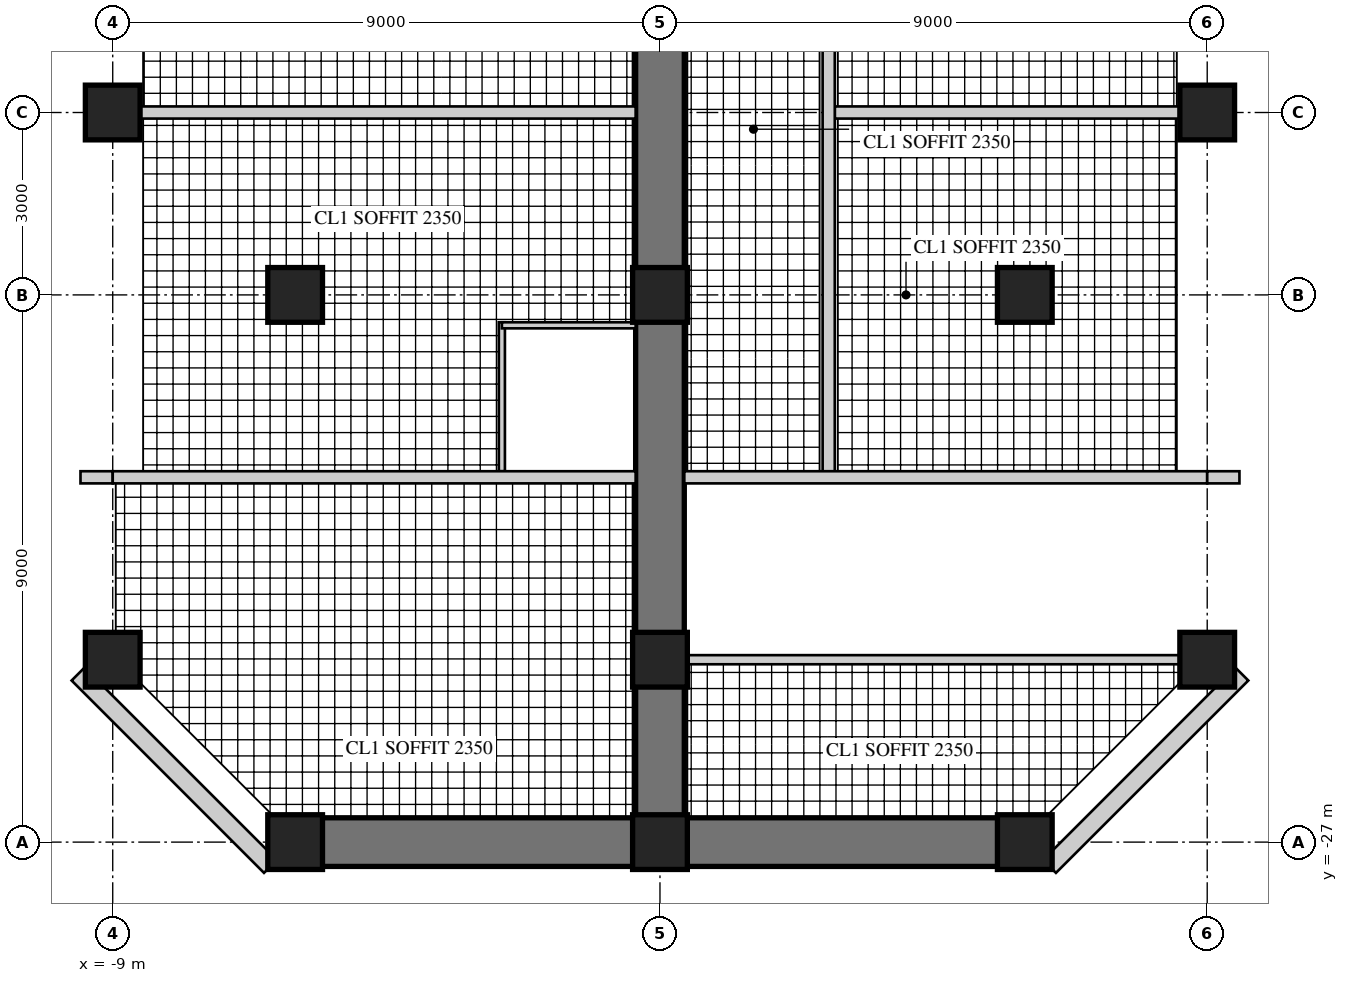
"""IFC4 building model, lengths in metres.
Left out: names, types, materials, properties, quantities, classifications, styles, units other than length and angle.
Written with IfcOpenShell. Run it as: python <this file> out.ifc"""

import sys

from ifc_helpers import new_model, si_unit, direction, frame, frame_2d, origin, origin_2d, place, context, subcontext, project, spatial, rectangle, hollow_rectangle, extrude, element, fill, save


model = new_model("IFC4")
c1 = context("Model", 3, precision=1e-05, world=origin(), true_north=direction((0.0, 1.0)))
c2 = subcontext(c1, "Body", "Model", "MODEL_VIEW")
j1 = project(units=[si_unit("LENGTHUNIT", "METRE"), si_unit("PLANEANGLEUNIT", "RADIAN")], contexts=[c1])
p1 = place(None, origin())
s1 = spatial("IfcSite", under=j1, at=p1, CompositionType="ELEMENT")
p2 = place(p1, origin())
s2 = spatial("IfcBuilding", under=s1, at=p2, CompositionType="ELEMENT")
p3 = place(p2, frame((0.0, 0.0, 189.9)))
s3 = spatial("IfcBuildingStorey", under=s2, at=p3, CompositionType="ELEMENT", Elevation=189.9)
p4 = place(p3, frame((0.0, -9.0, 0.0), z_axis=(0.0, 0.0, 1.0), x_axis=(0.0, -1.0, 0.0)))
e1 = element("IfcWall", 1, at=p4, inside=s3, PredefinedType="SHEAR", context=c2, shape_type="SweptSolid", body=[
    extrude(rectangle(XDim=18.0, YDim=0.8, at=frame_2d((9.0, 0.0))), origin(), (0.0, 0.0, 1.0), 3.4),
])
p5 = place(p4, frame((3.95, 0.0, 0.0)))
e2 = element("IfcOpeningElement", 2, at=p5, cuts=e1, PredefinedType="OPENING", context=c2, shape_type="SweptSolid", body=[
    extrude(rectangle(XDim=1.0, YDim=2.15, at=frame_2d((0.5, 1.075))), frame((0.0, 0.41, 0.0), z_axis=(0.0, -1.0, 0.0), x_axis=(1.0, 0.0, 0.0)), (0.0, 0.0, 1.0), 0.82),
])
p6 = place(p4, frame((6.6, 0.0, 0.0)))
e3 = element("IfcOpeningElement", 3, at=p6, cuts=e1, PredefinedType="OPENING", context=c2, shape_type="SweptSolid", body=[
    extrude(rectangle(XDim=1.0, YDim=2.15, at=frame_2d((0.5, 1.075))), frame((0.0, 0.41, 0.0), z_axis=(0.0, -1.0, 0.0), x_axis=(1.0, 0.0, 0.0)), (0.0, 0.0, 1.0), 0.82),
])
p7 = place(p4, frame((13.25, 0.0, 0.0)))
e4 = element("IfcOpeningElement", 4, at=p7, cuts=e1, PredefinedType="OPENING", context=c2, shape_type="SweptSolid", body=[
    extrude(rectangle(XDim=1.0, YDim=2.2, at=frame_2d((0.5, 1.1))), frame((0.0, 0.41, 0.0), z_axis=(0.0, -1.0, 0.0), x_axis=(1.0, 0.0, 0.0)), (0.0, 0.0, 1.0), 0.82),
])
p8 = place(p3, frame((-6.0, -27.0, 0.0), z_axis=(0.0, 0.0, 1.0), x_axis=(1.0, 0.0, 0.0)))
e5 = element("IfcWall", 5, at=p8, inside=s3, PredefinedType="SHEAR", context=c2, shape_type="SweptSolid", body=[
    extrude(rectangle(XDim=12.0, YDim=0.8, at=frame_2d((6.0, 0.0))), origin(), (0.0, 0.0, 1.0), 3.4),
])
p9 = place(p8, frame((1.625, 0.0, 0.6)))
e6 = element("IfcOpeningElement", 6, at=p9, cuts=e5, PredefinedType="OPENING", context=c2, shape_type="SweptSolid", body=[
    extrude(rectangle(XDim=3.0, YDim=2.4, at=frame_2d((1.5, 1.2))), frame((0.0, 0.41, 0.0), z_axis=(0.0, -1.0, 0.0), x_axis=(1.0, 0.0, 0.0)), (0.0, 0.0, 1.0), 0.82),
])
p10 = place(p8, frame((7.375, 0.0, 0.6)))
e7 = element("IfcOpeningElement", 7, at=p10, cuts=e5, PredefinedType="OPENING", context=c2, shape_type="SweptSolid", body=[
    extrude(rectangle(XDim=3.0, YDim=2.4, at=frame_2d((1.5, 1.2))), frame((0.0, 0.41, 0.0), z_axis=(0.0, -1.0, 0.0), x_axis=(1.0, 0.0, 0.0)), (0.0, 0.0, 1.0), 0.82),
])
for number, where, z_axis, x_axis in (
    (8, (-9.0, -15.0, 0.0), (0.0, 0.0, 1.0), (1.0, 0.0, 0.0)),
    (9, (-9.0, -24.0, 0.0), (0.0, 0.0, 1.0), (1.0, 0.0, 0.0)),
    (10, (9.0, -15.0, 0.0), (0.0, 0.0, 1.0), (1.0, 0.0, 0.0)),
    (11, (9.0, -24.0, 0.0), (0.0, 0.0, 1.0), (1.0, 0.0, 0.0)),
    (12, (-6.0, -27.0, 0.0), (0.0, 0.0, 1.0), (1.0, 0.0, 0.0)),
    (13, (0.0, -27.0, 0.0), (0.0, 0.0, 1.0), (1.0, 0.0, 0.0)),
    (14, (6.0, -27.0, 0.0), (0.0, 0.0, 1.0), (1.0, 0.0, 0.0)),
    (15, (-6.0, -18.0, 0.0), (0.0, 0.0, 1.0), (1.0, 0.0, 0.0)),
    (16, (0.0, -18.0, 0.0), (0.0, 0.0, 1.0), (1.0, 0.0, 0.0)),
    (17, (6.0, -18.0, 0.0), (0.0, 0.0, 1.0), (1.0, 0.0, 0.0)),
    (18, (0.0, -24.0, 0.0), (0.0, 0.0, 1.0), (1.0, 0.0, 0.0)),
):
    element("IfcColumn", number, at=place(p3, frame(where, z_axis=z_axis, x_axis=x_axis)), inside=s3, PredefinedType="COLUMN", context=c2, shape_type="SweptSolid", body=[
        extrude(rectangle(XDim=0.9, YDim=0.9, at=origin_2d()), origin(), (0.0, 0.0, 1.0), 3.4),
    ])
p11 = place(p3, frame((-9.57, -24.236, 0.0), z_axis=(0.0, 0.0, 1.0), x_axis=(0.707134062067, -0.707079499254, 0.0)))
e19 = element("IfcWall", 19, at=p11, inside=s3, PredefinedType="SOLIDWALL", context=c2, shape_type="SweptSolid", body=[
    extrude(rectangle(XDim=4.475, YDim=0.3, at=frame_2d((2.237, 0.0))), origin(), (0.0, 0.0, 1.0), 3.22),
])
p12 = place(p11, frame((1.787, 0.0, 0.3)))
e20 = element("IfcOpeningElement", 20, at=p12, cuts=e19, PredefinedType="OPENING", context=c2, shape_type="SweptSolid", body=[
    extrude(rectangle(XDim=0.9, YDim=2.4, at=frame_2d((0.45, 1.2))), frame((0.0, 0.16, 0.0), z_axis=(0.0, -1.0, 0.0), x_axis=(1.0, 0.0, 0.0)), (0.0, 0.0, 1.0), 0.32),
])
p13 = place(p3, frame((6.406, -27.4, 0.0), z_axis=(0.0, 0.0, 1.0), x_axis=(0.707134062067, 0.707079499254, 0.0)))
e21 = element("IfcWall", 21, at=p13, inside=s3, PredefinedType="SOLIDWALL", context=c2, shape_type="SweptSolid", body=[
    extrude(rectangle(XDim=4.475, YDim=0.3, at=frame_2d((2.237, 0.0))), origin(), (0.0, 0.0, 1.0), 3.22),
])
p14 = place(p13, frame((1.787, 0.0, 0.3)))
e22 = element("IfcOpeningElement", 22, at=p14, cuts=e21, PredefinedType="OPENING", context=c2, shape_type="SweptSolid", body=[
    extrude(rectangle(XDim=0.9, YDim=2.4, at=frame_2d((0.45, 1.2))), frame((0.0, 0.16, 0.0), z_axis=(0.0, -1.0, 0.0), x_axis=(1.0, 0.0, 0.0)), (0.0, 0.0, 1.0), 0.32),
])
p15 = place(p3, frame((2.875, -15.0, 0.0), z_axis=(0.0, 0.0, 1.0), x_axis=(1.0, 0.0, 0.0)))
e23 = element("IfcWall", 23, at=p15, inside=s3, PredefinedType="SOLIDWALL", context=c2, shape_type="SweptSolid", body=[
    extrude(rectangle(XDim=5.675, YDim=0.2, at=frame_2d((2.837, 0.0))), origin(), (0.0, 0.0, 1.0), 2.47),
])
p16 = place(p3, frame((-8.55, -15.0, 0.0), z_axis=(0.0, 0.0, 1.0), x_axis=(1.0, 0.0, 0.0)))
e24 = element("IfcWall", 24, at=p16, inside=s3, PredefinedType="SOLIDWALL", context=c2, shape_type="SweptSolid", body=[
    extrude(rectangle(XDim=8.15, YDim=0.2, at=frame_2d((4.075, 0.0))), origin(), (0.0, 0.0, 1.0), 2.47),
])
p17 = place(p3, frame((-2.6, -18.45, 0.0), z_axis=(0.0, 0.0, 1.0), x_axis=(0.0, -1.0, 0.0)))
e25 = element("IfcWall", 25, at=p17, inside=s3, PredefinedType="PARTITIONING", context=c2, shape_type="SweptSolid", body=[
    extrude(rectangle(XDim=2.45, YDim=0.1, at=frame_2d((1.225, 0.0))), origin(), (0.0, 0.0, 1.0), 3.22),
])
p18 = place(p3, frame((-2.6, -18.5, 0.0), z_axis=(0.0, 0.0, 1.0), x_axis=(1.0, 0.0, 0.0)))
e26 = element("IfcWall", 26, at=p18, inside=s3, PredefinedType="PARTITIONING", context=c2, shape_type="SweptSolid", body=[
    extrude(rectangle(XDim=2.2, YDim=0.1, at=frame_2d((1.1, 0.0))), origin(), (0.0, 0.0, 1.0), 3.22),
])
p19 = place(p18, frame((0.55, 0.0, 0.0)))
e27 = element("IfcOpeningElement", 27, at=p19, cuts=e26, PredefinedType="OPENING", context=c2, shape_type="SweptSolid", body=[
    extrude(rectangle(XDim=0.9, YDim=2.1, at=frame_2d((0.45, 1.05))), frame((0.0, 0.06, 0.0), z_axis=(0.0, -1.0, 0.0), x_axis=(1.0, 0.0, 0.0)), (0.0, 0.0, 1.0), 0.12),
])
p20 = place(p3, frame((2.775, -9.55, 0.0), z_axis=(0.0, 0.0, 1.0), x_axis=(0.0, -1.0, 0.0)))
e28 = element("IfcWall", 28, at=p20, inside=s3, PredefinedType="SOLIDWALL", context=c2, shape_type="SweptSolid", body=[
    extrude(rectangle(XDim=11.45, YDim=0.2, at=frame_2d((5.725, 0.0))), origin(), (0.0, 0.0, 1.0), 3.22),
])
p21 = place(p20, frame((3.4, 0.0, 0.0)))
e29 = element("IfcOpeningElement", 29, at=p21, cuts=e28, PredefinedType="OPENING", context=c2, shape_type="SweptSolid", body=[
    extrude(rectangle(XDim=1.0, YDim=2.15, at=frame_2d((0.5, 1.075))), frame((0.0, 0.11, 0.0), z_axis=(0.0, -1.0, 0.0), x_axis=(1.0, 0.0, 0.0)), (0.0, 0.0, 1.0), 0.22),
])
p22 = place(p20, frame((6.65, 0.0, 0.0)))
e30 = element("IfcOpeningElement", 30, at=p22, cuts=e28, PredefinedType="OPENING", context=c2, shape_type="SweptSolid", body=[
    extrude(rectangle(XDim=1.0, YDim=2.2, at=frame_2d((0.5, 1.1))), frame((0.0, 0.11, 0.0), z_axis=(0.0, -1.0, 0.0), x_axis=(1.0, 0.0, 0.0)), (0.0, 0.0, 1.0), 0.22),
])
p23 = place(p3, frame((0.4, -24.0, 0.0), z_axis=(0.0, 0.0, 1.0), x_axis=(1.0, 0.0, 0.0)))
e31 = element("IfcWall", 31, at=p23, inside=s3, PredefinedType="PARTITIONING", context=c2, shape_type="SweptSolid", body=[
    extrude(rectangle(XDim=8.15, YDim=0.15, at=frame_2d((4.075, 0.0))), origin(), (0.0, 0.0, 1.0), 2.47),
])
p24 = place(p23, frame((1.2, 0.0, 0.0)))
e32 = element("IfcOpeningElement", 32, at=p24, cuts=e31, PredefinedType="OPENING", context=c2, shape_type="SweptSolid", body=[
    extrude(rectangle(XDim=1.0, YDim=2.2, at=frame_2d((0.5, 1.1))), frame((0.0, 0.085, 0.0), z_axis=(0.0, -1.0, 0.0), x_axis=(1.0, 0.0, 0.0)), (0.0, 0.0, 1.0), 0.17),
])
p25 = place(p3, frame((-9.53, -21.0, 0.0), z_axis=(0.0, 0.0, 1.0), x_axis=(1.0, 0.0, 0.0)))
e33 = element("IfcWall", 33, at=p25, inside=s3, PredefinedType="SOLIDWALL", context=c2, shape_type="SweptSolid", body=[
    extrude(rectangle(XDim=0.53, YDim=0.2, at=frame_2d((0.265, 0.0))), origin(), (0.0, 0.0, 1.0), 3.22),
])
p26 = place(p3, frame((-9.0, -21.0, 0.0), z_axis=(0.0, 0.0, 1.0), x_axis=(1.0, 0.0, 0.0)))
e34 = element("IfcWall", 34, at=p26, inside=s3, PredefinedType="SOLIDWALL", context=c2, shape_type="SweptSolid", body=[
    extrude(rectangle(XDim=8.6, YDim=0.2, at=frame_2d((4.3, 0.0))), origin(), (0.0, 0.0, 1.0), 2.62),
])
p27 = place(p3, frame((0.4, -21.0, 0.0), z_axis=(0.0, 0.0, 1.0), x_axis=(1.0, 0.0, 0.0)))
e35 = element("IfcWall", 35, at=p27, inside=s3, PredefinedType="SOLIDWALL", context=c2, shape_type="SweptSolid", body=[
    extrude(rectangle(XDim=8.6, YDim=0.2, at=frame_2d((4.3, 0.0))), origin(), (0.0, 0.0, 1.0), 2.62),
])
p28 = place(p27, frame((0.4, 0.0, 0.0)))
e36 = element("IfcOpeningElement", 36, at=p28, cuts=e35, PredefinedType="OPENING", context=c2, shape_type="SweptSolid", body=[
    extrude(rectangle(XDim=1.0, YDim=2.2, at=frame_2d((0.5, 1.1))), frame((0.0, 0.11, 0.0), z_axis=(0.0, -1.0, 0.0), x_axis=(1.0, 0.0, 0.0)), (0.0, 0.0, 1.0), 0.22),
])
p29 = place(p3, frame((9.0, -21.0, 0.0), z_axis=(0.0, 0.0, 1.0), x_axis=(1.0, 0.0, 0.0)))
e37 = element("IfcWall", 37, at=p29, inside=s3, PredefinedType="SOLIDWALL", context=c2, shape_type="SweptSolid", body=[
    extrude(rectangle(XDim=0.53, YDim=0.2, at=frame_2d((0.265, 0.0))), origin(), (0.0, 0.0, 1.0), 3.22),
])
p30 = place(p12, origin())
e38 = element("IfcWindow", 38, at=p30, inside=s3, PartitioningType="SINGLE_PANEL", PredefinedType="WINDOW", context=c2, shape_type="SweptSolid", body=[
    extrude(hollow_rectangle(XDim=0.9, YDim=2.4, WallThickness=0.06, at=frame_2d((0.45, 1.2))), frame((0.0, 0.03, 0.0), z_axis=(0.0, -1.0, 0.0), x_axis=(1.0, 0.0, 0.0)), (0.0, 0.0, 1.0), 0.06),
    extrude(rectangle(XDim=0.779, YDim=2.279, at=frame_2d((0.45, 1.2))), frame((0.0, 0.03, 0.0), z_axis=(0.0, -1.0, 0.0), x_axis=(1.0, 0.0, 0.0)), (0.0, 0.0, 1.0), 0.06),
])
fill(e20, e38)
p31 = place(p9, origin())
e39 = element("IfcWindow", 39, at=p31, inside=s3, PartitioningType="SINGLE_PANEL", PredefinedType="WINDOW", context=c2, shape_type="SweptSolid", body=[
    extrude(hollow_rectangle(XDim=3.0, YDim=2.4, WallThickness=0.06, at=frame_2d((1.5, 1.2))), frame((0.0, 0.03, 0.0), z_axis=(0.0, -1.0, 0.0), x_axis=(1.0, 0.0, 0.0)), (0.0, 0.0, 1.0), 0.06),
    extrude(rectangle(XDim=2.879, YDim=2.279, at=frame_2d((1.5, 1.2))), frame((0.0, 0.03, 0.0), z_axis=(0.0, -1.0, 0.0), x_axis=(1.0, 0.0, 0.0)), (0.0, 0.0, 1.0), 0.06),
])
fill(e6, e39)
p32 = place(p10, origin())
e40 = element("IfcWindow", 40, at=p32, inside=s3, PartitioningType="SINGLE_PANEL", PredefinedType="WINDOW", context=c2, shape_type="SweptSolid", body=[
    extrude(hollow_rectangle(XDim=3.0, YDim=2.4, WallThickness=0.06, at=frame_2d((1.5, 1.2))), frame((0.0, 0.03, 0.0), z_axis=(0.0, -1.0, 0.0), x_axis=(1.0, 0.0, 0.0)), (0.0, 0.0, 1.0), 0.06),
    extrude(rectangle(XDim=2.879, YDim=2.279, at=frame_2d((1.5, 1.2))), frame((0.0, 0.03, 0.0), z_axis=(0.0, -1.0, 0.0), x_axis=(1.0, 0.0, 0.0)), (0.0, 0.0, 1.0), 0.06),
])
fill(e7, e40)
p33 = place(p14, origin())
e41 = element("IfcWindow", 41, at=p33, inside=s3, PartitioningType="SINGLE_PANEL", PredefinedType="WINDOW", context=c2, shape_type="SweptSolid", body=[
    extrude(hollow_rectangle(XDim=0.9, YDim=2.4, WallThickness=0.06, at=frame_2d((0.45, 1.2))), frame((0.0, 0.03, 0.0), z_axis=(0.0, -1.0, 0.0), x_axis=(1.0, 0.0, 0.0)), (0.0, 0.0, 1.0), 0.06),
    extrude(rectangle(XDim=0.779, YDim=2.279, at=frame_2d((0.45, 1.2))), frame((0.0, 0.03, 0.0), z_axis=(0.0, -1.0, 0.0), x_axis=(1.0, 0.0, 0.0)), (0.0, 0.0, 1.0), 0.06),
])
fill(e22, e41)
p34 = place(p19, frame((0.9, 0.0, 0.0), z_axis=(0.0, 0.0, 1.0), x_axis=(-1.0, 0.0, 0.0)))
e42 = element("IfcDoor", 42, at=p34, inside=s3, OperationType="SINGLE_SWING_RIGHT", PredefinedType="DOOR", context=c2, shape_type="SweptSolid", body=[
    extrude(rectangle(XDim=0.9, YDim=2.1, at=frame_2d((0.45, 1.05))), frame((0.0, 0.025, 0.0), z_axis=(0.0, -1.0, 0.0), x_axis=(1.0, 0.0, 0.0)), (0.0, 0.0, 1.0), 0.05),
])
fill(e27, e42)
p35 = place(p22, origin())
e43 = element("IfcDoor", 43, at=p35, inside=s3, OperationType="SINGLE_SWING_LEFT", PredefinedType="DOOR", context=c2, shape_type="SweptSolid", body=[
    extrude(rectangle(XDim=1.0, YDim=2.2, at=frame_2d((0.5, 1.1))), frame((0.0, 0.025, 0.0), z_axis=(0.0, -1.0, 0.0), x_axis=(1.0, 0.0, 0.0)), (0.0, 0.0, 1.0), 0.05),
])
fill(e30, e43)
p36 = place(p24, frame((1.0, 0.0, 0.0), z_axis=(0.0, 0.0, 1.0), x_axis=(-1.0, 0.0, 0.0)))
e44 = element("IfcDoor", 44, at=p36, inside=s3, OperationType="SINGLE_SWING_RIGHT", PredefinedType="DOOR", context=c2, shape_type="SweptSolid", body=[
    extrude(rectangle(XDim=1.0, YDim=2.2, at=frame_2d((0.5, 1.1))), frame((0.0, 0.025, 0.0), z_axis=(0.0, -1.0, 0.0), x_axis=(1.0, 0.0, 0.0)), (0.0, 0.0, 1.0), 0.05),
])
fill(e32, e44)
p37 = place(p28, frame((1.0, 0.0, 0.0), z_axis=(0.0, 0.0, 1.0), x_axis=(-1.0, 0.0, 0.0)))
e45 = element("IfcDoor", 45, at=p37, inside=s3, OperationType="SINGLE_SWING_RIGHT", PredefinedType="DOOR", context=c2, shape_type="SweptSolid", body=[
    extrude(rectangle(XDim=1.0, YDim=2.2, at=frame_2d((0.5, 1.1))), frame((0.0, 0.025, 0.0), z_axis=(0.0, -1.0, 0.0), x_axis=(1.0, 0.0, 0.0)), (0.0, 0.0, 1.0), 0.05),
])
fill(e36, e45)
p38 = place(p6, frame((1.0, 0.0, 0.0), z_axis=(0.0, 0.0, 1.0), x_axis=(-1.0, 0.0, 0.0)))
e46 = element("IfcDoor", 46, at=p38, inside=s3, OperationType="SINGLE_SWING_RIGHT", PredefinedType="DOOR", context=c2, shape_type="SweptSolid", body=[
    extrude(rectangle(XDim=1.0, YDim=2.15, at=frame_2d((0.5, 1.075))), frame((0.0, 0.025, 0.0), z_axis=(0.0, -1.0, 0.0), x_axis=(1.0, 0.0, 0.0)), (0.0, 0.0, 1.0), 0.05),
])
fill(e3, e46)
p39 = place(p7, origin())
e47 = element("IfcDoor", 47, at=p39, inside=s3, OperationType="SINGLE_SWING_RIGHT", PredefinedType="DOOR", context=c2, shape_type="SweptSolid", body=[
    extrude(rectangle(XDim=1.0, YDim=2.2, at=frame_2d((0.5, 1.1))), frame((0.0, 0.025, 0.0), z_axis=(0.0, -1.0, 0.0), x_axis=(1.0, 0.0, 0.0)), (0.0, 0.0, 1.0), 0.05),
])
fill(e4, e47)
save(model, sys.argv[1])
